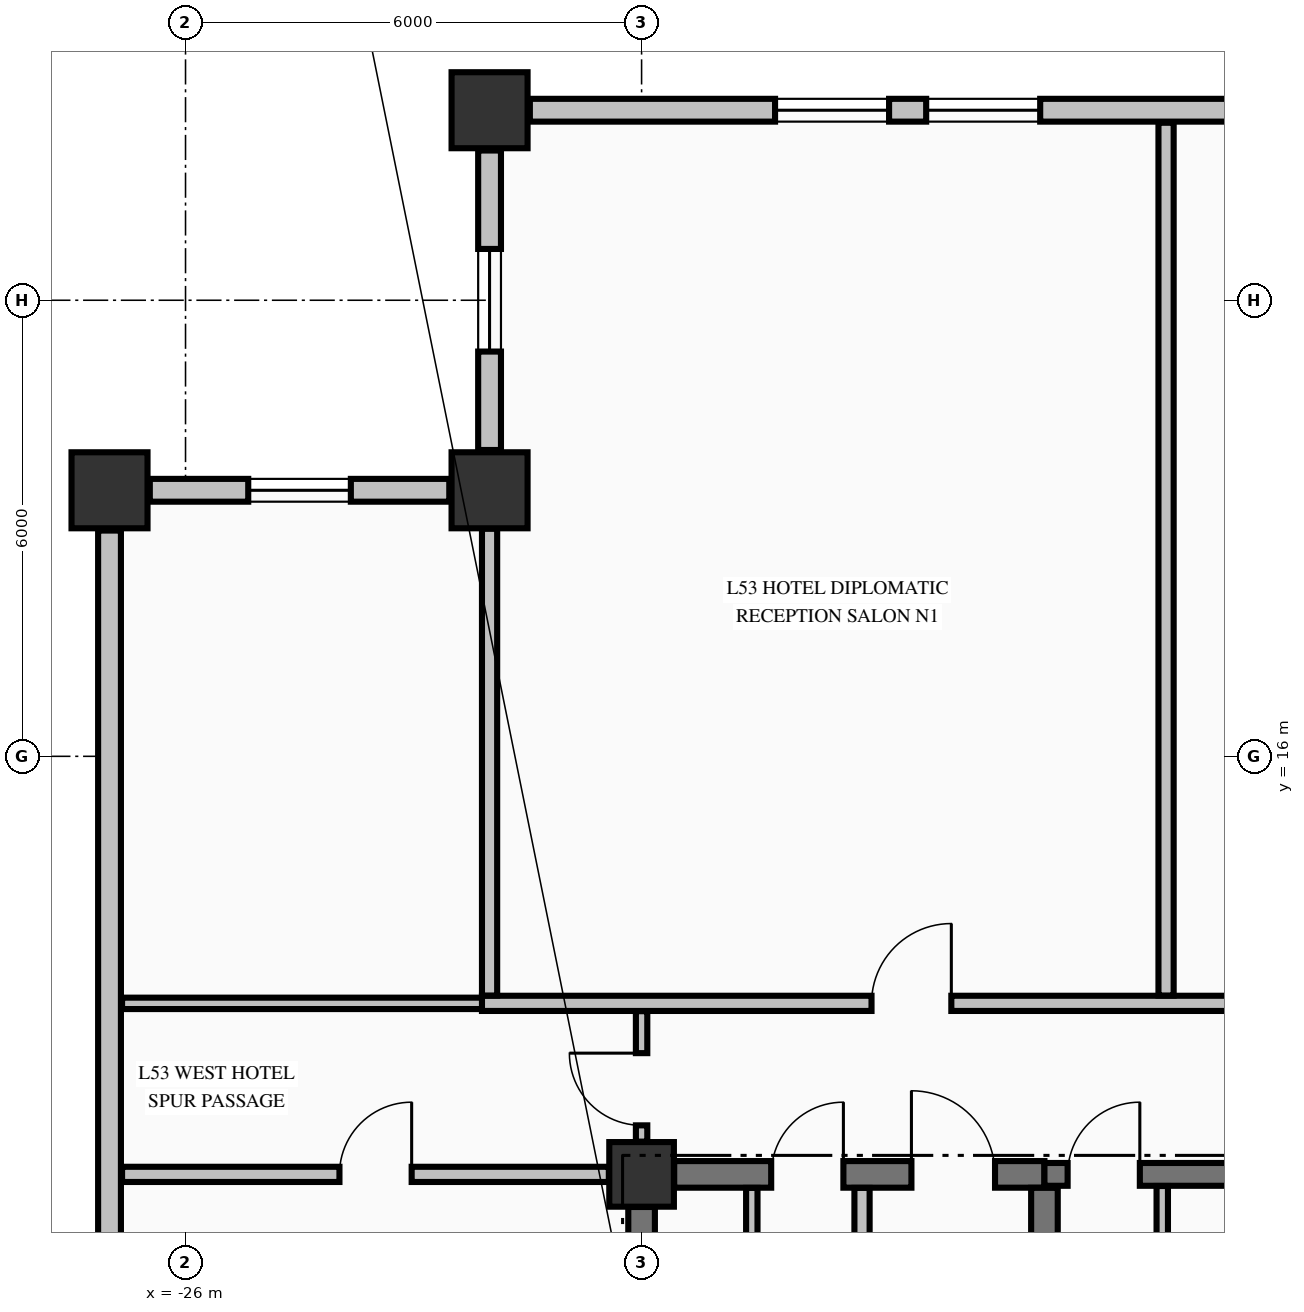
"""IFC4 building model, lengths in metres.
Left out: names, types, materials, properties, quantities, classifications, styles, units other than length and angle.
Written with IfcOpenShell. Run it as: python <this file> out.ifc"""

import sys

from ifc_helpers import new_model, si_unit, direction, frame, frame_2d, origin, origin_2d, place, context, subcontext, project, spatial, rectangle, extrude, element, fill, save


model = new_model("IFC4")
c1 = context("Model", 3, precision=1e-05, world=origin(), true_north=direction((0.0, 1.0)))
c2 = subcontext(c1, "Body", "Model", "MODEL_VIEW")
j1 = project(units=[si_unit("LENGTHUNIT", "METRE"), si_unit("PLANEANGLEUNIT", "RADIAN")], contexts=[c1])
p1 = place(None, origin())
s1 = spatial("IfcSite", under=j1, at=p1, CompositionType="ELEMENT")
p2 = place(p1, origin())
s2 = spatial("IfcBuilding", under=s1, at=p2, CompositionType="ELEMENT")
p3 = place(p2, frame((0.0, 0.0, 205.06)))
s3 = spatial("IfcBuildingStorey", under=s2, at=p3, CompositionType="ELEMENT", Elevation=205.06)
for number, where, z_axis, x_axis in (
    (1, (-22.0, 24.5, -0.25), (0.0, 0.0, 1.0), (1.0, 0.0, 0.0)),
    (2, (-27.0, 19.5, -0.25), (0.0, 0.0, 1.0), (1.0, 0.0, 0.0)),
    (3, (-22.0, 19.5, -0.25), (0.0, 0.0, 1.0), (1.0, 0.0, 0.0)),
):
    element("IfcColumn", number, at=place(p3, frame(where, z_axis=z_axis, x_axis=x_axis)), inside=s3, PredefinedType="COLUMN", context=c2, shape_type="SweptSolid", body=[
        extrude(rectangle(XDim=1.0, YDim=1.0, at=origin_2d()), origin(), (0.0, 0.0, 1.0), 3.4),
    ])
p4 = place(p3, frame((-20.0, 10.5, -0.25), z_axis=(0.0, 0.0, 1.0), x_axis=(1.0, 0.0, 0.0)))
e4 = element("IfcColumn", 4, at=p4, inside=s3, PredefinedType="COLUMN", context=c2, shape_type="SweptSolid", body=[
    extrude(rectangle(XDim=0.85, YDim=0.85, at=origin_2d()), origin(), (0.0, 0.0, 1.0), 3.4),
])
p5 = place(p3, frame((-22.0, 23.97, 0.0), z_axis=(0.0, 0.0, 1.0), x_axis=(0.0, -1.0, 0.0)))
e5 = element("IfcWall", 5, at=p5, inside=s3, PredefinedType="STANDARD", context=c2, shape_type="SweptSolid", body=[
    extrude(rectangle(XDim=3.94, YDim=0.3, at=frame_2d((1.97, 0.0))), origin(), (0.0, 0.0, 1.0), 2.542),
])
p6 = place(p5, frame((1.295, 0.0, 0.68)))
e6 = element("IfcOpeningElement", 6, at=p6, cuts=e5, PredefinedType="OPENING", context=c2, shape_type="SweptSolid", body=[
    extrude(rectangle(XDim=1.35, YDim=1.42, at=frame_2d((0.675, 0.71))), frame((0.0, 0.16, 0.0), z_axis=(0.0, -1.0, 0.0), x_axis=(1.0, 0.0, 0.0)), (0.0, 0.0, 1.0), 0.32),
])
p7 = place(p3, frame((-22.53, 19.5, 0.0), z_axis=(0.0, 0.0, 1.0), x_axis=(-1.0, 0.0, 0.0)))
e7 = element("IfcWall", 7, at=p7, inside=s3, PredefinedType="STANDARD", context=c2, shape_type="SweptSolid", body=[
    extrude(rectangle(XDim=3.94, YDim=0.3, at=frame_2d((1.97, 0.0))), origin(), (0.0, 0.0, 1.0), 2.542),
])
p8 = place(p7, frame((1.295, 0.0, 0.68)))
e8 = element("IfcOpeningElement", 8, at=p8, cuts=e7, PredefinedType="OPENING", context=c2, shape_type="SweptSolid", body=[
    extrude(rectangle(XDim=1.35, YDim=1.42, at=frame_2d((0.675, 0.71))), frame((0.0, 0.16, 0.0), z_axis=(0.0, -1.0, 0.0), x_axis=(1.0, 0.0, 0.0)), (0.0, 0.0, 1.0), 0.32),
])
p9 = place(p3, frame((-11.53, 24.5, 0.0), z_axis=(0.0, 0.0, 1.0), x_axis=(-1.0, 0.0, 0.0)))
e9 = element("IfcWall", 9, at=p9, inside=s3, PredefinedType="STANDARD", context=c2, shape_type="SweptSolid", body=[
    extrude(rectangle(XDim=9.94, YDim=0.3, at=frame_2d((4.97, 0.0))), origin(), (0.0, 0.0, 1.0), 2.542),
])
p10 = place(p9, frame((3.226, 0.0, 0.72)))
e10 = element("IfcOpeningElement", 10, at=p10, cuts=e9, PredefinedType="OPENING", context=c2, shape_type="SweptSolid", body=[
    extrude(rectangle(XDim=1.5, YDim=1.6, at=frame_2d((0.75, 0.8))), frame((0.0, 0.16, 0.0), z_axis=(0.0, -1.0, 0.0), x_axis=(1.0, 0.0, 0.0)), (0.0, 0.0, 1.0), 0.32),
])
p11 = place(p9, frame((5.214, 0.0, 0.72)))
e11 = element("IfcOpeningElement", 11, at=p11, cuts=e9, PredefinedType="OPENING", context=c2, shape_type="SweptSolid", body=[
    extrude(rectangle(XDim=1.5, YDim=1.6, at=frame_2d((0.75, 0.8))), frame((0.0, 0.16, 0.0), z_axis=(0.0, -1.0, 0.0), x_axis=(1.0, 0.0, 0.0)), (0.0, 0.0, 1.0), 0.32),
])
p12 = place(p3, frame((-27.0, 18.97, 0.0), z_axis=(0.0, 0.0, 1.0), x_axis=(0.0, -1.0, 0.0)))
e12 = element("IfcWall", 12, at=p12, inside=s3, PredefinedType="STANDARD", context=c2, shape_type="SweptSolid", body=[
    extrude(rectangle(XDim=9.44, YDim=0.3, at=frame_2d((4.72, 0.0))), origin(), (0.0, 0.0, 1.0), 2.542),
])
p13 = place(p3, frame((-19.571, 10.5, 0.0), z_axis=(0.0, 0.0, 1.0), x_axis=(1.0, 0.0, 0.0)))
e13 = element("IfcWall", 13, at=p13, inside=s3, PredefinedType="SHEAR", context=c2, shape_type="SweptSolid", body=[
    extrude(rectangle(XDim=4.871, YDim=0.35, at=frame_2d((2.436, 0.0))), origin(), (0.0, 0.0, 1.0), 3.15),
])
p14 = place(p13, frame((3.121, 0.0, 0.0)))
e14 = element("IfcOpeningElement", 14, at=p14, cuts=e13, PredefinedType="OPENING", context=c2, shape_type="SweptSolid", body=[
    extrude(rectangle(XDim=1.1, YDim=2.15, at=frame_2d((0.55, 1.075))), frame((0.0, 0.185, 0.0), z_axis=(0.0, -1.0, 0.0), x_axis=(1.0, 0.0, 0.0)), (0.0, 0.0, 1.0), 0.37),
])
p15 = place(p13, frame((1.276, 0.0, 0.0)))
e15 = element("IfcOpeningElement", 15, at=p15, cuts=e13, PredefinedType="OPENING", context=c2, shape_type="SweptSolid", body=[
    extrude(rectangle(XDim=0.95, YDim=2.15, at=frame_2d((0.475, 1.075))), frame((0.0, 0.185, 0.0), z_axis=(0.0, -1.0, 0.0), x_axis=(1.0, 0.0, 0.0)), (0.0, 0.0, 1.0), 0.37),
])
p16 = place(p3, frame((-14.7, 10.5, 0.0), z_axis=(0.0, 0.0, 1.0), x_axis=(1.0, 0.0, 0.0)))
e16 = element("IfcWall", 16, at=p16, inside=s3, PredefinedType="SHEAR", context=c2, shape_type="SweptSolid", body=[
    extrude(rectangle(XDim=3.271, YDim=0.3, at=frame_2d((1.635, 0.0))), origin(), (0.0, 0.0, 1.0), 3.15),
])
p17 = place(p16, frame((0.305, 0.0, 0.0)))
e17 = element("IfcOpeningElement", 17, at=p17, cuts=e16, PredefinedType="OPENING", context=c2, shape_type="SweptSolid", body=[
    extrude(rectangle(XDim=0.95, YDim=2.15, at=frame_2d((0.475, 1.075))), frame((0.0, 0.16, 0.0), z_axis=(0.0, -1.0, 0.0), x_axis=(1.0, 0.0, 0.0)), (0.0, 0.0, 1.0), 0.32),
])
p18 = place(p3, frame((-26.835, 10.5, 0.0), z_axis=(0.0, 0.0, 1.0), x_axis=(1.0, 0.0, 0.0)))
e18 = element("IfcWall", 18, at=p18, inside=s3, PredefinedType="PARTITIONING", context=c2, shape_type="SweptSolid", body=[
    extrude(rectangle(XDim=6.404, YDim=0.2, at=frame_2d((3.202, 0.0))), origin(), (0.0, 0.0, 1.0), 3.15),
])
p19 = place(p18, frame((2.86, 0.0, 0.0)))
e19 = element("IfcOpeningElement", 19, at=p19, cuts=e18, PredefinedType="OPENING", context=c2, shape_type="SweptSolid", body=[
    extrude(rectangle(XDim=0.95, YDim=2.15, at=frame_2d((0.475, 1.075))), frame((0.0, 0.11, 0.0), z_axis=(0.0, -1.0, 0.0), x_axis=(1.0, 0.0, 0.0)), (0.0, 0.0, 1.0), 0.22),
])
p20 = place(p3, frame((-26.835, 12.75, 0.0), z_axis=(0.0, 0.0, 1.0), x_axis=(1.0, 0.0, 0.0)))
e20 = element("IfcWall", 20, at=p20, inside=s3, PredefinedType="PARTITIONING", context=c2, shape_type="SweptSolid", body=[
    extrude(rectangle(XDim=4.935, YDim=0.15, at=frame_2d((2.468, 0.0))), origin(), (0.0, 0.0, 1.0), 3.15),
])
p21 = place(p3, frame((-22.1, 12.75, 0.0), z_axis=(0.0, 0.0, 1.0), x_axis=(1.0, 0.0, 0.0)))
e21 = element("IfcWall", 21, at=p21, inside=s3, PredefinedType="PARTITIONING", context=c2, shape_type="SweptSolid", body=[
    extrude(rectangle(XDim=39.2, YDim=0.2, at=frame_2d((19.6, 0.0))), origin(), (0.0, 0.0, 1.0), 3.15),
])
p22 = place(p21, frame((5.125, 0.0, 0.0)))
e22 = element("IfcOpeningElement", 22, at=p22, cuts=e21, PredefinedType="OPENING", context=c2, shape_type="SweptSolid", body=[
    extrude(rectangle(XDim=1.05, YDim=2.15, at=frame_2d((0.525, 1.075))), frame((0.0, 0.11, 0.0), z_axis=(0.0, -1.0, 0.0), x_axis=(1.0, 0.0, 0.0)), (0.0, 0.0, 1.0), 0.22),
])
p23 = place(p21, frame((10.175, 0.0, 0.0)))
e23 = element("IfcOpeningElement", 23, at=p23, cuts=e21, PredefinedType="OPENING", context=c2, shape_type="SweptSolid", body=[
    extrude(rectangle(XDim=0.95, YDim=2.15, at=frame_2d((0.475, 1.075))), frame((0.0, 0.11, 0.0), z_axis=(0.0, -1.0, 0.0), x_axis=(1.0, 0.0, 0.0)), (0.0, 0.0, 1.0), 0.22),
])
p24 = place(p21, frame((22.475, 0.0, 0.0)))
e24 = element("IfcOpeningElement", 24, at=p24, cuts=e21, PredefinedType="OPENING", context=c2, shape_type="SweptSolid", body=[
    extrude(rectangle(XDim=0.95, YDim=2.15, at=frame_2d((0.475, 1.075))), frame((0.0, 0.11, 0.0), z_axis=(0.0, -1.0, 0.0), x_axis=(1.0, 0.0, 0.0)), (0.0, 0.0, 1.0), 0.22),
])
p25 = place(p21, frame((34.675, 0.0, 0.0)))
e25 = element("IfcOpeningElement", 25, at=p25, cuts=e21, PredefinedType="OPENING", context=c2, shape_type="SweptSolid", body=[
    extrude(rectangle(XDim=0.95, YDim=2.15, at=frame_2d((0.475, 1.075))), frame((0.0, 0.11, 0.0), z_axis=(0.0, -1.0, 0.0), x_axis=(1.0, 0.0, 0.0)), (0.0, 0.0, 1.0), 0.22),
])
p26 = place(p3, frame((-20.0, 5.327, 0.0), z_axis=(0.0, 0.0, 1.0), x_axis=(0.0, 1.0, 0.0)))
e26 = element("IfcWall", 26, at=p26, inside=s3, PredefinedType="SHEAR", context=c2, shape_type="SweptSolid", body=[
    extrude(rectangle(XDim=4.744, YDim=0.35, at=frame_2d((2.372, 0.0))), origin(), (0.0, 0.0, 1.0), 3.15),
])
p27 = place(p3, frame((-14.7, 5.852, 0.0), z_axis=(0.0, 0.0, 1.0), x_axis=(0.0, 1.0, 0.0)))
e27 = element("IfcWall", 27, at=p27, inside=s3, PredefinedType="SHEAR", context=c2, shape_type="SweptSolid", body=[
    extrude(rectangle(XDim=4.471, YDim=0.35, at=frame_2d((2.235, 0.0))), origin(), (0.0, 0.0, 1.0), 3.15),
])
p28 = place(p3, frame((-22.0, 12.853, 0.0), z_axis=(0.0, 0.0, 1.0), x_axis=(0.0, 1.0, 0.0)))
e28 = element("IfcWall", 28, at=p28, inside=s3, PredefinedType="PARTITIONING", context=c2, shape_type="SweptSolid", body=[
    extrude(rectangle(XDim=6.141, YDim=0.2, at=frame_2d((3.07, 0.0))), origin(), (0.0, 0.0, 1.0), 3.15),
])
p29 = place(p3, frame((-20.0, 10.931, 0.0), z_axis=(0.0, 0.0, 1.0), x_axis=(0.0, 1.0, 0.0)))
e29 = element("IfcWall", 29, at=p29, inside=s3, PredefinedType="PARTITIONING", context=c2, shape_type="SweptSolid", body=[
    extrude(rectangle(XDim=1.716, YDim=0.15, at=frame_2d((0.858, 0.0))), origin(), (0.0, 0.0, 1.0), 2.342),
])
p30 = place(p29, frame((0.214, 0.0, 0.0)))
e30 = element("IfcOpeningElement", 30, at=p30, cuts=e29, PredefinedType="OPENING", context=c2, shape_type="SweptSolid", body=[
    extrude(rectangle(XDim=0.95, YDim=2.15, at=frame_2d((0.475, 1.075))), frame((0.0, 0.085, 0.0), z_axis=(0.0, -1.0, 0.0), x_axis=(1.0, 0.0, 0.0)), (0.0, 0.0, 1.0), 0.17),
])
p31 = place(p3, frame((-18.55, 5.328, 0.0), z_axis=(0.0, 0.0, 1.0), x_axis=(0.0, 1.0, 0.0)))
e31 = element("IfcWall", 31, at=p31, inside=s3, PredefinedType="PARTITIONING", context=c2, shape_type="SweptSolid", body=[
    extrude(rectangle(XDim=4.994, YDim=0.15, at=frame_2d((2.497, 0.0))), origin(), (0.0, 0.0, 1.0), 3.15),
])
p32 = place(p31, frame((2.047, 0.0, 0.0)))
e32 = element("IfcOpeningElement", 32, at=p32, cuts=e31, PredefinedType="OPENING", context=c2, shape_type="SweptSolid", body=[
    extrude(rectangle(XDim=0.95, YDim=2.15, at=frame_2d((0.475, 1.075))), frame((0.0, 0.085, 0.0), z_axis=(0.0, -1.0, 0.0), x_axis=(1.0, 0.0, 0.0)), (0.0, 0.0, 1.0), 0.17),
])
p33 = place(p3, frame((-17.1, 5.328, 0.0), z_axis=(0.0, 0.0, 1.0), x_axis=(0.0, 1.0, 0.0)))
e33 = element("IfcWall", 33, at=p33, inside=s3, PredefinedType="PARTITIONING", context=c2, shape_type="SweptSolid", body=[
    extrude(rectangle(XDim=4.994, YDim=0.2, at=frame_2d((2.497, 0.0))), origin(), (0.0, 0.0, 1.0), 3.15),
])
p34 = place(p3, frame((-13.15, 7.228, 0.0), z_axis=(0.0, 0.0, 1.0), x_axis=(0.0, 1.0, 0.0)))
e34 = element("IfcWall", 34, at=p34, inside=s3, PredefinedType="PARTITIONING", context=c2, shape_type="SweptSolid", body=[
    extrude(rectangle(XDim=3.119, YDim=0.15, at=frame_2d((1.56, 0.0))), origin(), (0.0, 0.0, 1.0), 3.15),
])
p35 = place(p34, frame((1.097, 0.0, 0.0)))
e35 = element("IfcOpeningElement", 35, at=p35, cuts=e34, PredefinedType="OPENING", context=c2, shape_type="SweptSolid", body=[
    extrude(rectangle(XDim=0.95, YDim=2.15, at=frame_2d((0.475, 1.075))), frame((0.0, 0.085, 0.0), z_axis=(0.0, -1.0, 0.0), x_axis=(1.0, 0.0, 0.0)), (0.0, 0.0, 1.0), 0.17),
])
p36 = place(p3, frame((-13.1, 12.853, 0.0), z_axis=(0.0, 0.0, 1.0), x_axis=(0.0, 1.0, 0.0)))
e36 = element("IfcWall", 36, at=p36, inside=s3, PredefinedType="PARTITIONING", context=c2, shape_type="SweptSolid", body=[
    extrude(rectangle(XDim=11.482, YDim=0.2, at=frame_2d((5.741, 0.0))), origin(), (0.0, 0.0, 1.0), 3.15),
])
p37 = place(p6, origin())
e37 = element("IfcWindow", 37, at=p37, inside=s3, PartitioningType="SINGLE_PANEL", PredefinedType="WINDOW", context=c2, shape_type="SweptSolid", body=[
    extrude(rectangle(XDim=1.35, YDim=1.42, at=frame_2d((0.675, 0.71))), frame((0.0, 0.03, 0.0), z_axis=(0.0, -1.0, 0.0), x_axis=(1.0, 0.0, 0.0)), (0.0, 0.0, 1.0), 0.06),
])
fill(e6, e37)
p38 = place(p8, origin())
e38 = element("IfcWindow", 38, at=p38, inside=s3, PartitioningType="SINGLE_PANEL", PredefinedType="WINDOW", context=c2, shape_type="SweptSolid", body=[
    extrude(rectangle(XDim=1.35, YDim=1.42, at=frame_2d((0.675, 0.71))), frame((0.0, 0.03, 0.0), z_axis=(0.0, -1.0, 0.0), x_axis=(1.0, 0.0, 0.0)), (0.0, 0.0, 1.0), 0.06),
])
fill(e8, e38)
p39 = place(p10, origin())
e39 = element("IfcWindow", 39, at=p39, inside=s3, PartitioningType="SINGLE_PANEL", PredefinedType="WINDOW", context=c2, shape_type="SweptSolid", body=[
    extrude(rectangle(XDim=1.5, YDim=1.6, at=frame_2d((0.75, 0.8))), frame((0.0, 0.03, 0.0), z_axis=(0.0, -1.0, 0.0), x_axis=(1.0, 0.0, 0.0)), (0.0, 0.0, 1.0), 0.06),
])
fill(e10, e39)
p40 = place(p11, origin())
e40 = element("IfcWindow", 40, at=p40, inside=s3, PartitioningType="SINGLE_PANEL", PredefinedType="WINDOW", context=c2, shape_type="SweptSolid", body=[
    extrude(rectangle(XDim=1.5, YDim=1.6, at=frame_2d((0.75, 0.8))), frame((0.0, 0.03, 0.0), z_axis=(0.0, -1.0, 0.0), x_axis=(1.0, 0.0, 0.0)), (0.0, 0.0, 1.0), 0.06),
])
fill(e11, e40)
p41 = place(p17, origin())
e41 = element("IfcDoor", 41, at=p41, inside=s3, OperationType="SINGLE_SWING_RIGHT", PredefinedType="DOOR", context=c2, shape_type="SweptSolid", body=[
    extrude(rectangle(XDim=0.95, YDim=2.15, at=frame_2d((0.475, 1.075))), frame((0.0, 0.025, 0.0), z_axis=(0.0, -1.0, 0.0), x_axis=(1.0, 0.0, 0.0)), (0.0, 0.0, 1.0), 0.05),
])
fill(e17, e41)
p42 = place(p14, origin())
e42 = element("IfcDoor", 42, at=p42, inside=s3, OperationType="SINGLE_SWING_LEFT", PredefinedType="DOOR", context=c2, shape_type="SweptSolid", body=[
    extrude(rectangle(XDim=1.1, YDim=2.15, at=frame_2d((0.55, 1.075))), frame((0.0, 0.025, 0.0), z_axis=(0.0, -1.0, 0.0), x_axis=(1.0, 0.0, 0.0)), (0.0, 0.0, 1.0), 0.05),
])
fill(e14, e42)
p43 = place(p15, origin())
e43 = element("IfcDoor", 43, at=p43, inside=s3, OperationType="SINGLE_SWING_RIGHT", PredefinedType="DOOR", context=c2, shape_type="SweptSolid", body=[
    extrude(rectangle(XDim=0.95, YDim=2.15, at=frame_2d((0.475, 1.075))), frame((0.0, 0.025, 0.0), z_axis=(0.0, -1.0, 0.0), x_axis=(1.0, 0.0, 0.0)), (0.0, 0.0, 1.0), 0.05),
])
fill(e15, e43)
p44 = place(p22, origin())
e44 = element("IfcDoor", 44, at=p44, inside=s3, OperationType="SINGLE_SWING_RIGHT", PredefinedType="DOOR", context=c2, shape_type="SweptSolid", body=[
    extrude(rectangle(XDim=1.05, YDim=2.15, at=frame_2d((0.525, 1.075))), frame((0.0, 0.025, 0.0), z_axis=(0.0, -1.0, 0.0), x_axis=(1.0, 0.0, 0.0)), (0.0, 0.0, 1.0), 0.05),
])
fill(e22, e44)
p45 = place(p30, origin())
e45 = element("IfcDoor", 45, at=p45, inside=s3, OperationType="SINGLE_SWING_RIGHT", PredefinedType="DOOR", context=c2, shape_type="SweptSolid", body=[
    extrude(rectangle(XDim=0.95, YDim=2.15, at=frame_2d((0.475, 1.075))), frame((0.0, 0.025, 0.0), z_axis=(0.0, -1.0, 0.0), x_axis=(1.0, 0.0, 0.0)), (0.0, 0.0, 1.0), 0.05),
])
fill(e30, e45)
p46 = place(p19, origin())
e46 = element("IfcDoor", 46, at=p46, inside=s3, OperationType="SINGLE_SWING_RIGHT", PredefinedType="DOOR", context=c2, shape_type="SweptSolid", body=[
    extrude(rectangle(XDim=0.95, YDim=2.15, at=frame_2d((0.475, 1.075))), frame((0.0, 0.025, 0.0), z_axis=(0.0, -1.0, 0.0), x_axis=(1.0, 0.0, 0.0)), (0.0, 0.0, 1.0), 0.05),
])
fill(e19, e46)
save(model, sys.argv[1])
